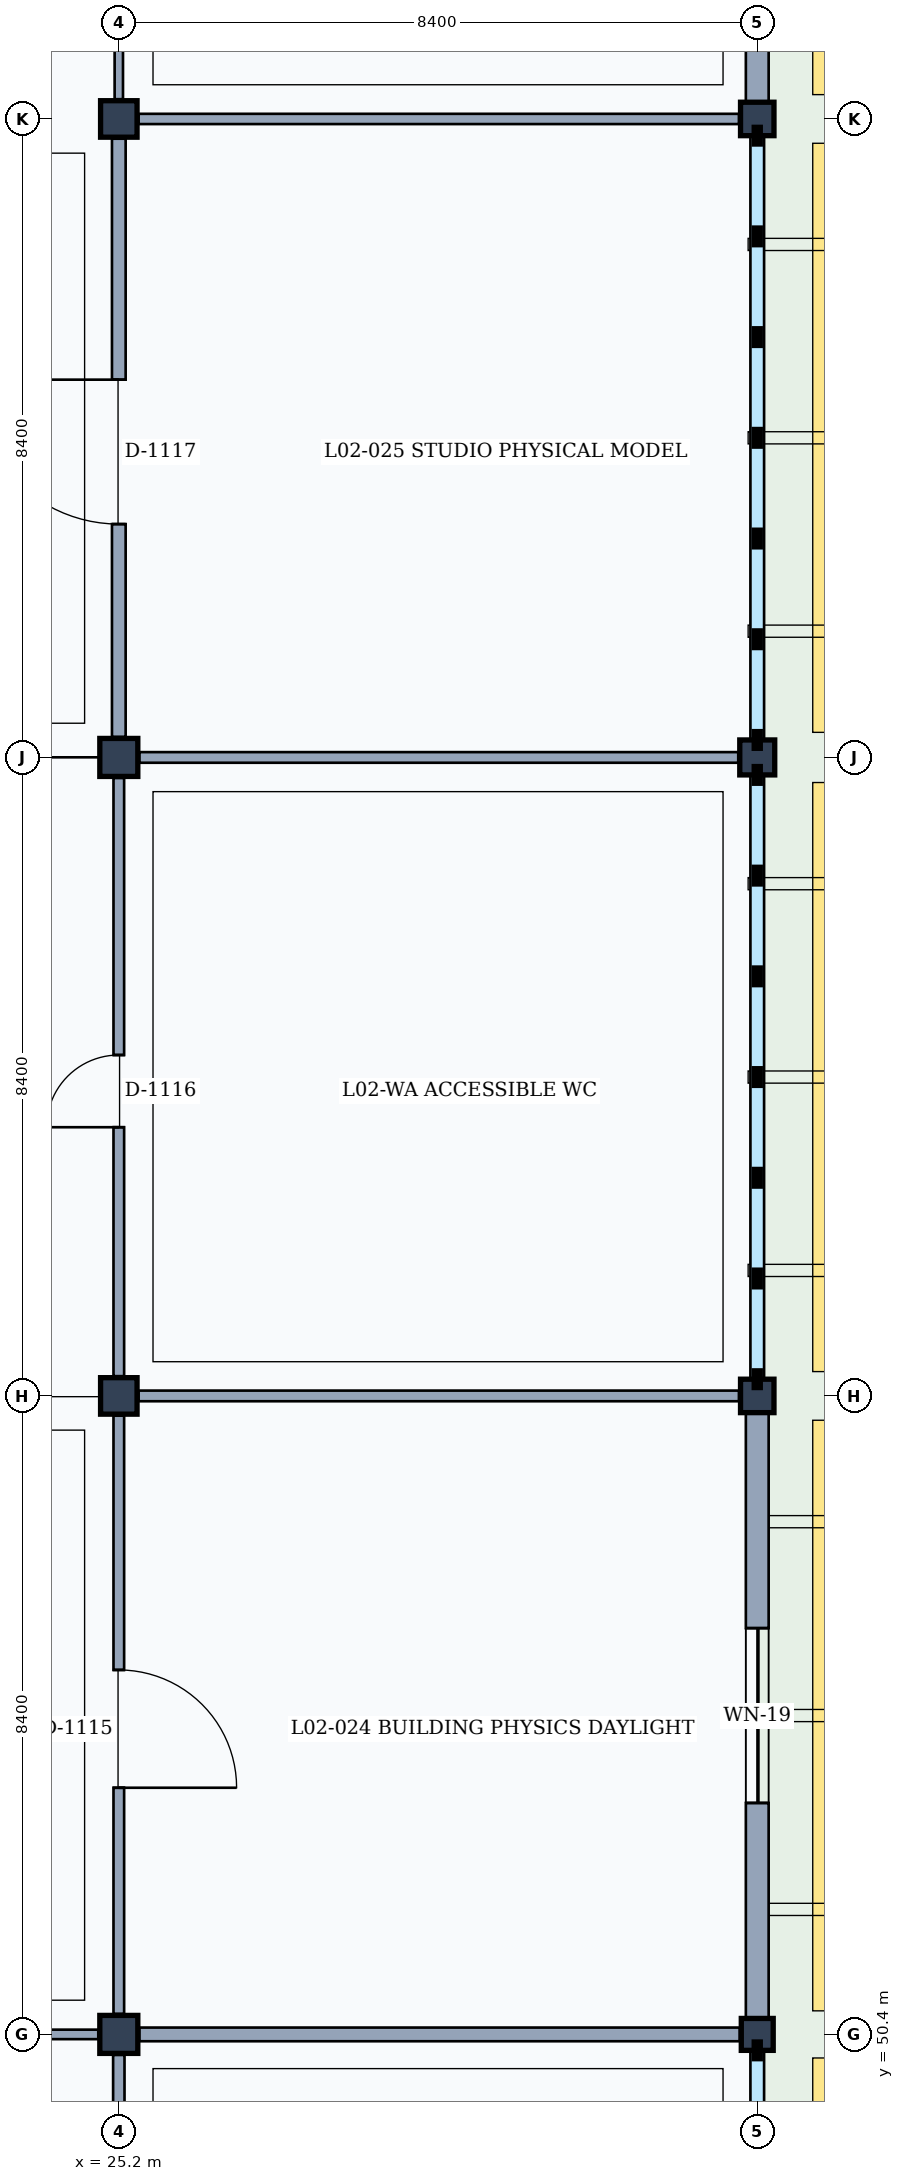
"""IFC4 building model, lengths in metres.
Left out: names, types, materials, properties, quantities, classifications, styles, units other than length and angle.
Written with IfcOpenShell. Run it as: python <this file> out.ifc"""

import sys

from ifc_helpers import new_model, si_unit, direction, frame, frame_2d, origin, origin_2d, place, context, subcontext, project, spatial, rectangle, extrude, element, fill, save


model = new_model("IFC4")
c1 = context("Model", 3, precision=1e-05, world=origin(), true_north=direction((0.0, 1.0)))
c2 = subcontext(c1, "Body", "Model", "MODEL_VIEW")
j1 = project(units=[si_unit("LENGTHUNIT", "METRE"), si_unit("PLANEANGLEUNIT", "RADIAN")], contexts=[c1])
p1 = place(None, origin())
s1 = spatial("IfcSite", under=j1, at=p1, CompositionType="ELEMENT")
p2 = place(p1, origin())
s2 = spatial("IfcBuilding", under=s1, at=p2, CompositionType="ELEMENT")
p3 = place(p2, frame((0.0, 0.0, 9.6)))
s3 = spatial("IfcBuildingStorey", under=s2, at=p3, CompositionType="ELEMENT", Elevation=9.6)
p4 = place(p3, frame((25.2, 50.4, 0.0), z_axis=(0.0, 0.0, 1.0), x_axis=(1.0, 0.0, 0.0)))
e1 = element("IfcColumn", 1, at=p4, inside=s3, PredefinedType="COLUMN", context=c2, shape_type="SweptSolid", body=[
    extrude(rectangle(XDim=0.5, YDim=0.5, at=origin_2d()), origin(), (0.0, 0.0, 1.0), 4.2),
])
p5 = place(p3, frame((25.2, 58.8, 0.0), z_axis=(0.0, 0.0, 1.0), x_axis=(1.0, 0.0, 0.0)))
e2 = element("IfcColumn", 2, at=p5, inside=s3, PredefinedType="COLUMN", context=c2, shape_type="SweptSolid", body=[
    extrude(rectangle(XDim=0.48, YDim=0.48, at=origin_2d()), origin(), (0.0, 0.0, 1.0), 4.2),
])
p6 = place(p3, frame((25.2, 67.2, 0.0), z_axis=(0.0, 0.0, 1.0), x_axis=(1.0, 0.0, 0.0)))
e3 = element("IfcColumn", 3, at=p6, inside=s3, PredefinedType="COLUMN", context=c2, shape_type="SweptSolid", body=[
    extrude(rectangle(XDim=0.5, YDim=0.5, at=origin_2d()), origin(), (0.0, 0.0, 1.0), 4.2),
])
p7 = place(p3, frame((25.2, 75.6, 0.0), z_axis=(0.0, 0.0, 1.0), x_axis=(1.0, 0.0, 0.0)))
e4 = element("IfcColumn", 4, at=p7, inside=s3, PredefinedType="COLUMN", context=c2, shape_type="SweptSolid", body=[
    extrude(rectangle(XDim=0.48, YDim=0.48, at=origin_2d()), origin(), (0.0, 0.0, 1.0), 4.2),
])
p8 = place(p3, frame((33.6, 50.4, 0.0), z_axis=(0.0, 0.0, 1.0), x_axis=(1.0, 0.0, 0.0)))
e5 = element("IfcColumn", 5, at=p8, inside=s3, PredefinedType="COLUMN", context=c2, shape_type="SweptSolid", body=[
    extrude(rectangle(XDim=0.42, YDim=0.42, at=origin_2d()), origin(), (0.0, 0.0, 1.0), 4.2),
])
p9 = place(p3, frame((33.6, 58.8, 0.0), z_axis=(0.0, 0.0, 1.0), x_axis=(1.0, 0.0, 0.0)))
e6 = element("IfcColumn", 6, at=p9, inside=s3, PredefinedType="COLUMN", context=c2, shape_type="SweptSolid", body=[
    extrude(rectangle(XDim=0.44, YDim=0.44, at=origin_2d()), origin(), (0.0, 0.0, 1.0), 4.2),
])
p10 = place(p3, frame((33.6, 67.2, 0.0), z_axis=(0.0, 0.0, 1.0), x_axis=(1.0, 0.0, 0.0)))
e7 = element("IfcColumn", 7, at=p10, inside=s3, PredefinedType="COLUMN", context=c2, shape_type="SweptSolid", body=[
    extrude(rectangle(XDim=0.46, YDim=0.46, at=origin_2d()), origin(), (0.0, 0.0, 1.0), 4.2),
])
p11 = place(p3, frame((33.6, 75.6, 0.0), z_axis=(0.0, 0.0, 1.0), x_axis=(1.0, 0.0, 0.0)))
e8 = element("IfcColumn", 8, at=p11, inside=s3, PredefinedType="COLUMN", context=c2, shape_type="SweptSolid", body=[
    extrude(rectangle(XDim=0.44, YDim=0.44, at=origin_2d()), origin(), (0.0, 0.0, 1.0), 4.2),
])
p12 = place(p3, frame((33.6, 58.58, 0.0), z_axis=(0.0, 0.0, 1.0), x_axis=(0.0, -1.0, 0.0)))
e9 = element("IfcWall", 9, at=p12, inside=s3, PredefinedType="SOLIDWALL", context=c2, shape_type="SweptSolid", body=[
    extrude(rectangle(XDim=7.97, YDim=0.3, at=frame_2d((3.985, 0.0))), origin(), (0.0, 0.0, 1.0), 3.36),
])
p13 = place(p12, frame((2.835, 0.0, 0.9)))
e10 = element("IfcOpeningElement", 10, at=p13, cuts=e9, PredefinedType="OPENING", context=c2, shape_type="SweptSolid", body=[
    extrude(rectangle(XDim=2.3, YDim=1.5, at=frame_2d((1.15, 0.75))), frame((0.0, 0.16, 0.0), z_axis=(0.0, -1.0, 0.0), x_axis=(1.0, 0.0, 0.0)), (0.0, 0.0, 1.0), 0.32),
])
p14 = place(p3, frame((33.6, 83.77, 0.0), z_axis=(0.0, 0.0, 1.0), x_axis=(0.0, -1.0, 0.0)))
e11 = element("IfcWall", 11, at=p14, inside=s3, PredefinedType="SOLIDWALL", context=c2, shape_type="SweptSolid", body=[
    extrude(rectangle(XDim=7.95, YDim=0.3, at=frame_2d((3.975, 0.0))), origin(), (0.0, 0.0, 1.0), 3.36),
])
p15 = place(p14, frame((2.6, 0.0, 0.9)))
e12 = element("IfcOpeningElement", 12, at=p15, cuts=e11, PredefinedType="OPENING", context=c2, shape_type="SweptSolid", body=[
    extrude(rectangle(XDim=2.75, YDim=1.85, at=frame_2d((1.375, 0.925))), frame((0.0, 0.16, 0.0), z_axis=(0.0, -1.0, 0.0), x_axis=(1.0, 0.0, 0.0)), (0.0, 0.0, 1.0), 0.32),
])
p16 = place(p3, frame((25.2, 42.22, 0.0), z_axis=(0.0, 0.0, 1.0), x_axis=(0.0, 1.0, 0.0)))
e13 = element("IfcWall", 13, at=p16, inside=s3, PredefinedType="PARTITIONING", context=c2, shape_type="SweptSolid", body=[
    extrude(rectangle(XDim=7.91, YDim=0.15, at=frame_2d((3.955, 0.0))), origin(), (0.0, 0.0, 1.0), 3.32),
])
p17 = place(p16, frame((3.1, 0.0, 0.0)))
e14 = element("IfcOpeningElement", 14, at=p17, cuts=e13, PredefinedType="OPENING", context=c2, shape_type="SweptSolid", body=[
    extrude(rectangle(XDim=1.3, YDim=2.2, at=frame_2d((0.65, 1.1))), frame((0.0, 0.085, 0.0), z_axis=(0.0, -1.0, 0.0), x_axis=(1.0, 0.0, 0.0)), (0.0, 0.0, 1.0), 0.17),
])
p18 = place(p3, frame((17.07, 50.4, 0.0), z_axis=(0.0, 0.0, 1.0), x_axis=(1.0, 0.0, 0.0)))
e15 = element("IfcWall", 15, at=p18, inside=s3, PredefinedType="PARTITIONING", context=c2, shape_type="SweptSolid", body=[
    extrude(rectangle(XDim=7.86, YDim=0.125, at=frame_2d((3.93, 0.0))), origin(), (0.0, 0.0, 1.0), 3.32),
])
p19 = place(p3, frame((25.2, 50.67, 0.0), z_axis=(0.0, 0.0, 1.0), x_axis=(0.0, 1.0, 0.0)))
e16 = element("IfcWall", 16, at=p19, inside=s3, PredefinedType="PARTITIONING", context=c2, shape_type="SweptSolid", body=[
    extrude(rectangle(XDim=7.87, YDim=0.14, at=frame_2d((3.935, 0.0))), origin(), (0.0, 0.0, 1.0), 3.32),
])
p20 = place(p19, frame((2.975, 0.0, 0.0)))
e17 = element("IfcOpeningElement", 17, at=p20, cuts=e16, PredefinedType="OPENING", context=c2, shape_type="SweptSolid", body=[
    extrude(rectangle(XDim=1.55, YDim=2.35, at=frame_2d((0.775, 1.175))), frame((0.0, 0.08, 0.0), z_axis=(0.0, -1.0, 0.0), x_axis=(1.0, 0.0, 0.0)), (0.0, 0.0, 1.0), 0.16),
])
p21 = place(p3, frame((25.2, 59.06, 0.0), z_axis=(0.0, 0.0, 1.0), x_axis=(0.0, 1.0, 0.0)))
e18 = element("IfcWall", 18, at=p21, inside=s3, PredefinedType="PARTITIONING", context=c2, shape_type="SweptSolid", body=[
    extrude(rectangle(XDim=7.87, YDim=0.14, at=frame_2d((3.935, 0.0))), origin(), (0.0, 0.0, 1.0), 3.32),
])
p22 = place(p21, frame((3.275, 0.0, 0.0)))
e19 = element("IfcOpeningElement", 19, at=p22, cuts=e18, PredefinedType="OPENING", context=c2, shape_type="SweptSolid", body=[
    extrude(rectangle(XDim=0.95, YDim=2.15, at=frame_2d((0.475, 1.075))), frame((0.0, 0.08, 0.0), z_axis=(0.0, -1.0, 0.0), x_axis=(1.0, 0.0, 0.0)), (0.0, 0.0, 1.0), 0.16),
])
p23 = place(p3, frame((25.2, 67.47, 0.0), z_axis=(0.0, 0.0, 1.0), x_axis=(0.0, 1.0, 0.0)))
e20 = element("IfcWall", 20, at=p23, inside=s3, PredefinedType="PARTITIONING", context=c2, shape_type="SweptSolid", body=[
    extrude(rectangle(XDim=7.87, YDim=0.18, at=frame_2d((3.935, 0.0))), origin(), (0.0, 0.0, 1.0), 3.32),
])
p24 = place(p23, frame((2.8, 0.0, 0.0)))
e21 = element("IfcOpeningElement", 21, at=p24, cuts=e20, PredefinedType="OPENING", context=c2, shape_type="SweptSolid", body=[
    extrude(rectangle(XDim=1.9, YDim=2.4, at=frame_2d((0.95, 1.2))), frame((0.0, 0.1, 0.0), z_axis=(0.0, -1.0, 0.0), x_axis=(1.0, 0.0, 0.0)), (0.0, 0.0, 1.0), 0.2),
])
p25 = place(p3, frame((25.2, 75.86, 0.0), z_axis=(0.0, 0.0, 1.0), x_axis=(0.0, 1.0, 0.0)))
e22 = element("IfcWall", 22, at=p25, inside=s3, PredefinedType="PARTITIONING", context=c2, shape_type="SweptSolid", body=[
    extrude(rectangle(XDim=7.87, YDim=0.11, at=frame_2d((3.935, 0.0))), origin(), (0.0, 0.0, 1.0), 3.32),
])
p26 = place(p25, frame((3.3, 0.0, 0.0)))
e23 = element("IfcOpeningElement", 23, at=p26, cuts=e22, PredefinedType="OPENING", context=c2, shape_type="SweptSolid", body=[
    extrude(rectangle(XDim=0.9, YDim=2.1, at=frame_2d((0.45, 1.05))), frame((0.0, 0.065, 0.0), z_axis=(0.0, -1.0, 0.0), x_axis=(1.0, 0.0, 0.0)), (0.0, 0.0, 1.0), 0.13),
])
p27 = place(p3, frame((25.47, 50.4, 0.0), z_axis=(0.0, 0.0, 1.0), x_axis=(1.0, 0.0, 0.0)))
e24 = element("IfcWall", 24, at=p27, inside=s3, PredefinedType="PARTITIONING", context=c2, shape_type="SweptSolid", body=[
    extrude(rectangle(XDim=7.9, YDim=0.18, at=frame_2d((3.95, 0.0))), origin(), (0.0, 0.0, 1.0), 3.32),
])
p28 = place(p3, frame((25.46, 58.8, 0.0), z_axis=(0.0, 0.0, 1.0), x_axis=(1.0, 0.0, 0.0)))
e25 = element("IfcWall", 25, at=p28, inside=s3, PredefinedType="PARTITIONING", context=c2, shape_type="SweptSolid", body=[
    extrude(rectangle(XDim=7.9, YDim=0.14, at=frame_2d((3.95, 0.0))), origin(), (0.0, 0.0, 1.0), 3.32),
])
p29 = place(p3, frame((25.47, 67.2, 0.0), z_axis=(0.0, 0.0, 1.0), x_axis=(1.0, 0.0, 0.0)))
e26 = element("IfcWall", 26, at=p29, inside=s3, PredefinedType="PARTITIONING", context=c2, shape_type="SweptSolid", body=[
    extrude(rectangle(XDim=7.88, YDim=0.14, at=frame_2d((3.94, 0.0))), origin(), (0.0, 0.0, 1.0), 3.32),
])
p30 = place(p3, frame((25.46, 75.6, 0.0), z_axis=(0.0, 0.0, 1.0), x_axis=(1.0, 0.0, 0.0)))
e27 = element("IfcWall", 27, at=p30, inside=s3, PredefinedType="PARTITIONING", context=c2, shape_type="SweptSolid", body=[
    extrude(rectangle(XDim=7.9, YDim=0.135, at=frame_2d((3.95, 0.0))), origin(), (0.0, 0.0, 1.0), 3.32),
])
p31 = place(p13, origin())
e28 = element("IfcWindow", 28, at=p31, inside=s3, PartitioningType="SINGLE_PANEL", PredefinedType="WINDOW", context=c2, shape_type="SweptSolid", body=[
    extrude(rectangle(XDim=2.3, YDim=1.5, at=frame_2d((1.15, 0.75))), frame((0.0, 0.03, 0.0), z_axis=(0.0, -1.0, 0.0), x_axis=(1.0, 0.0, 0.0)), (0.0, 0.0, 1.0), 0.06),
])
fill(e10, e28)
p32 = place(p20, frame((1.55, 0.0, 0.0), z_axis=(0.0, 0.0, 1.0), x_axis=(-1.0, 0.0, 0.0)))
e29 = element("IfcDoor", 29, at=p32, inside=s3, OperationType="SINGLE_SWING_RIGHT", PredefinedType="DOOR", context=c2, shape_type="SweptSolid", body=[
    extrude(rectangle(XDim=1.55, YDim=2.35, at=frame_2d((0.775, 1.175))), frame((0.0, 0.025, 0.0), z_axis=(0.0, -1.0, 0.0), x_axis=(1.0, 0.0, 0.0)), (0.0, 0.0, 1.0), 0.05),
])
fill(e17, e29)
p33 = place(p22, origin())
e30 = element("IfcDoor", 30, at=p33, inside=s3, OperationType="SINGLE_SWING_LEFT", PredefinedType="DOOR", context=c2, shape_type="SweptSolid", body=[
    extrude(rectangle(XDim=0.95, YDim=2.15, at=frame_2d((0.475, 1.075))), frame((0.0, 0.025, 0.0), z_axis=(0.0, -1.0, 0.0), x_axis=(1.0, 0.0, 0.0)), (0.0, 0.0, 1.0), 0.05),
])
fill(e19, e30)
p34 = place(p24, origin())
e31 = element("IfcDoor", 31, at=p34, inside=s3, OperationType="SINGLE_SWING_RIGHT", PredefinedType="DOOR", context=c2, shape_type="SweptSolid", body=[
    extrude(rectangle(XDim=1.9, YDim=2.4, at=frame_2d((0.95, 1.2))), frame((0.0, 0.025, 0.0), z_axis=(0.0, -1.0, 0.0), x_axis=(1.0, 0.0, 0.0)), (0.0, 0.0, 1.0), 0.05),
])
fill(e21, e31)
save(model, sys.argv[1])
